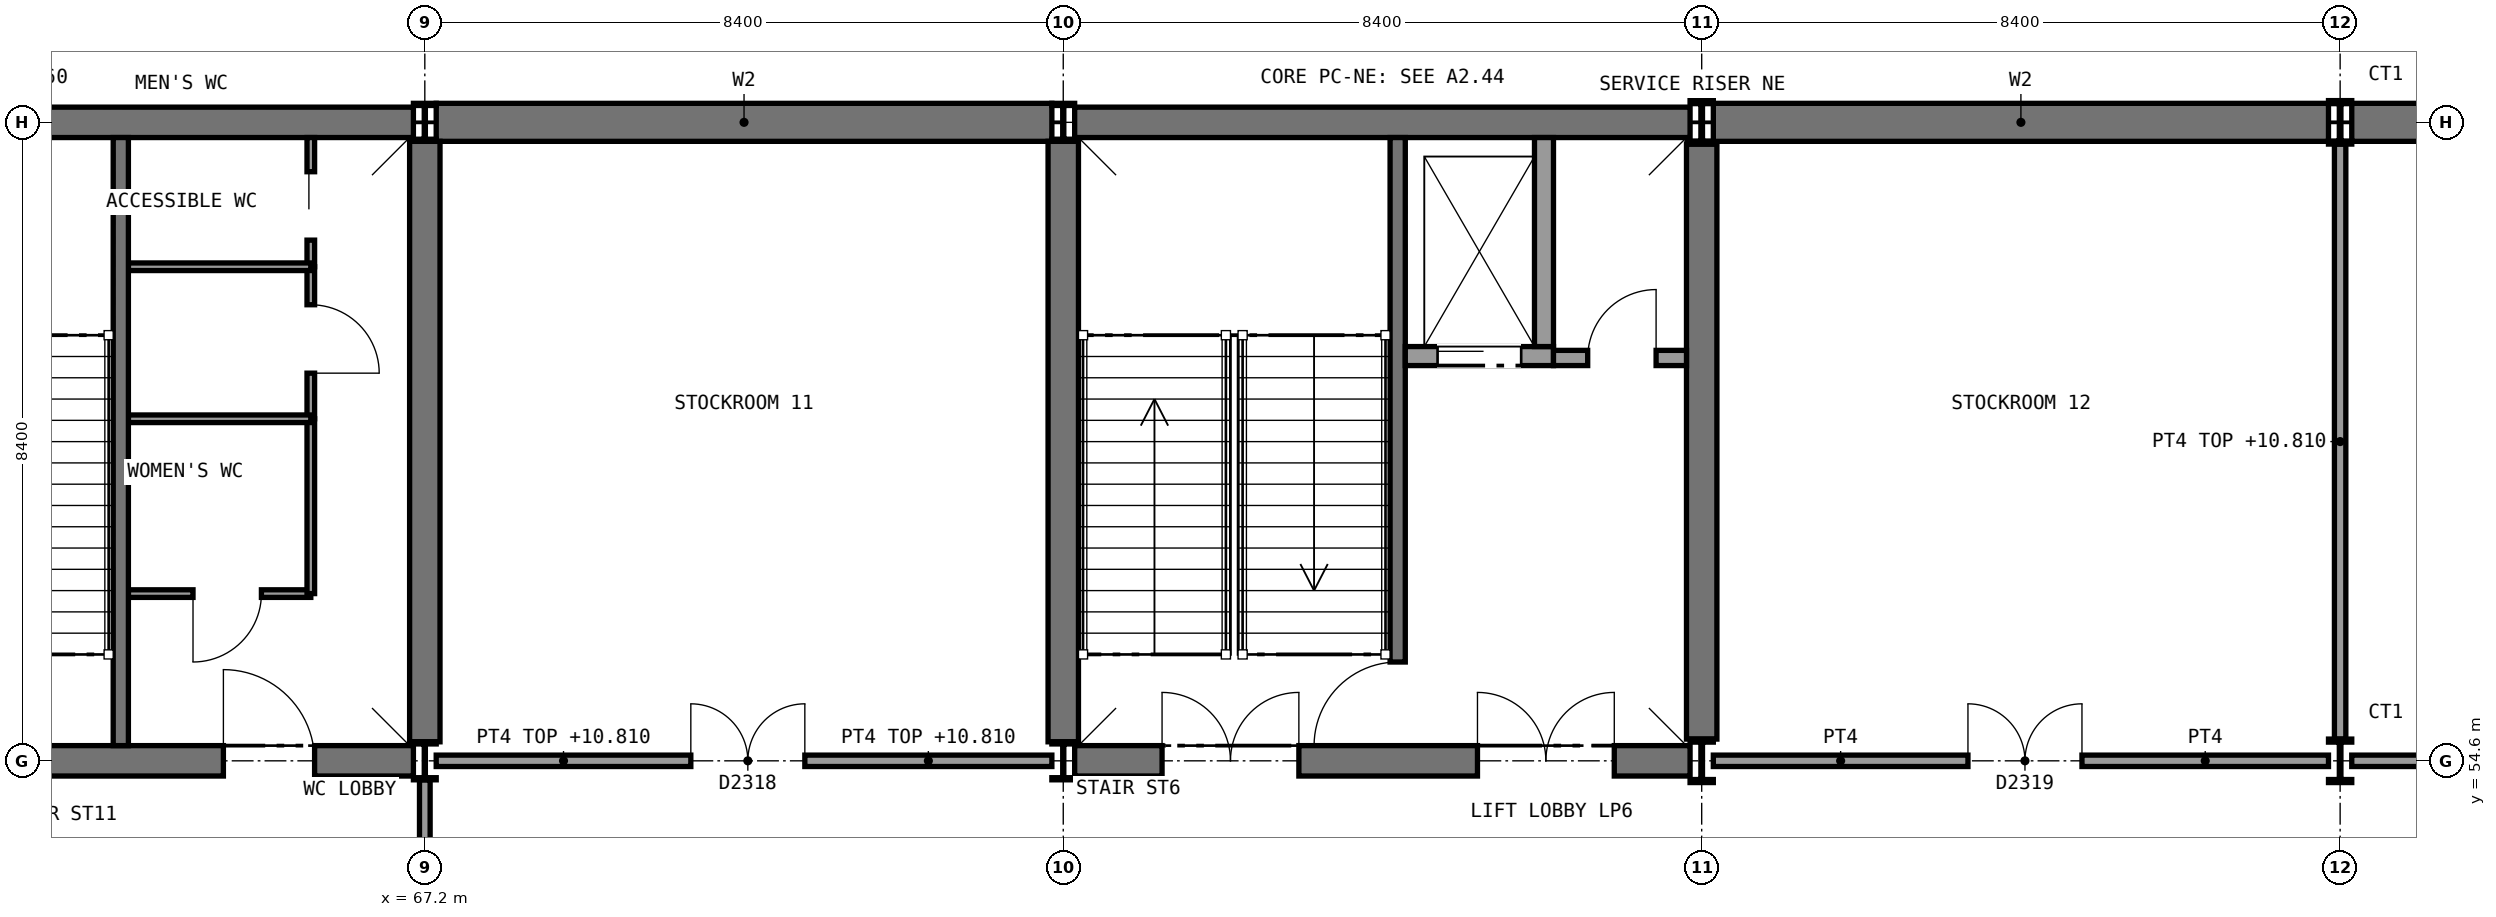
"""IFC4 building model, lengths in metres.
Left out: names, types, materials, properties, quantities, classifications, styles, units other than length and angle.
Written with IfcOpenShell. Run it as: python <this file> out.ifc"""

import sys

from ifc_helpers import new_model, si_unit, direction, frame, frame_2d, origin, origin_2d, place, context, subcontext, project, spatial, rectangle, i_section, extrude, element, fill, save


model = new_model("IFC4")
c1 = context("Model", 3, precision=1e-05, world=origin(), true_north=direction((0.0, 1.0)))
c2 = subcontext(c1, "Body", "Model", "MODEL_VIEW")
j1 = project(units=[si_unit("LENGTHUNIT", "METRE"), si_unit("PLANEANGLEUNIT", "RADIAN")], contexts=[c1])
p1 = place(None, origin())
s1 = spatial("IfcSite", under=j1, at=p1, CompositionType="ELEMENT")
p2 = place(p1, origin())
s2 = spatial("IfcBuilding", under=s1, at=p2, CompositionType="ELEMENT")
p3 = place(p2, frame((0.0, 0.0, 6.0)))
s3 = spatial("IfcBuildingStorey", under=s2, at=p3, CompositionType="ELEMENT", Elevation=6.0)
p4 = place(p3, frame((67.35, 63.0, 0.0), z_axis=(0.0, 0.0, 1.0), x_axis=(1.0, 0.0, 0.0)))
e1 = element("IfcWall", 1, at=p4, inside=s3, PredefinedType="SHEAR", context=c2, shape_type="SweptSolid", body=[
    extrude(rectangle(XDim=8.1, YDim=0.5, at=frame_2d((4.05, 0.0))), origin(), (0.0, 0.0, 1.0), 5.25),
])
p5 = place(p3, frame((84.153, 63.0, 0.0), z_axis=(0.0, 0.0, 1.0), x_axis=(1.0, 0.0, 0.0)))
e2 = element("IfcWall", 2, at=p5, inside=s3, PredefinedType="SHEAR", context=c2, shape_type="SweptSolid", body=[
    extrude(rectangle(XDim=8.094, YDim=0.5, at=frame_2d((4.047, 0.0))), origin(), (0.0, 0.0, 1.0), 5.25),
])
p6 = place(p3, frame((92.553, 63.0, 0.0), z_axis=(0.0, 0.0, 1.0), x_axis=(1.0, 0.0, 0.0)))
e3 = element("IfcWall", 3, at=p6, inside=s3, PredefinedType="SHEAR", context=c2, shape_type="SweptSolid", body=[
    extrude(rectangle(XDim=8.094, YDim=0.5, at=frame_2d((4.047, 0.0))), origin(), (0.0, 0.0, 1.0), 5.25),
])
p7 = place(p3, frame((75.75, 63.0, 0.0), z_axis=(0.0, 0.0, 1.0), x_axis=(1.0, 0.0, 0.0)))
e4 = element("IfcWall", 4, at=p7, inside=s3, PredefinedType="SHEAR", context=c2, shape_type="SweptSolid", body=[
    extrude(rectangle(XDim=8.097, YDim=0.4, at=frame_2d((4.048, 0.0))), origin(), (0.0, 0.0, 1.0), 5.25),
])
p8 = place(p3, frame((75.75, 54.6, 0.0), z_axis=(0.0, 0.0, 1.0), x_axis=(1.0, 0.0, 0.0)))
e5 = element("IfcWall", 5, at=p8, inside=s3, PredefinedType="SHEAR", context=c2, shape_type="SweptSolid", body=[
    extrude(rectangle(XDim=8.097, YDim=0.4, at=frame_2d((4.048, 0.0))), origin(), (0.0, 0.0, 1.0), 5.25),
])
p9 = place(p8, frame((1.15, 0.0, 0.0)))
e6 = element("IfcOpeningElement", 6, at=p9, cuts=e5, PredefinedType="OPENING", context=c2, shape_type="SweptSolid", body=[
    extrude(rectangle(XDim=1.8, YDim=2.1, at=frame_2d((0.9, 1.05))), frame((0.0, 0.21, 0.0), z_axis=(0.0, -1.0, 0.0), x_axis=(1.0, 0.0, 0.0)), (0.0, 0.0, 1.0), 0.42),
])
p10 = place(p8, frame((5.3, 0.0, 0.0)))
e7 = element("IfcOpeningElement", 7, at=p10, cuts=e5, PredefinedType="OPENING", context=c2, shape_type="SweptSolid", body=[
    extrude(rectangle(XDim=1.8, YDim=2.1, at=frame_2d((0.9, 1.05))), frame((0.0, 0.21, 0.0), z_axis=(0.0, -1.0, 0.0), x_axis=(1.0, 0.0, 0.0)), (0.0, 0.0, 1.0), 0.42),
])
p11 = place(p3, frame((75.6, 54.85, 0.0), z_axis=(0.0, 0.0, 1.0), x_axis=(0.0, 1.0, 0.0)))
e8 = element("IfcWall", 8, at=p11, inside=s3, PredefinedType="SHEAR", context=c2, shape_type="SweptSolid", body=[
    extrude(rectangle(XDim=7.9, YDim=0.4, at=frame_2d((3.95, 0.0))), origin(), (0.0, 0.0, 1.0), 5.25),
])
p12 = place(p3, frame((84.0, 54.886, 0.0), z_axis=(0.0, 0.0, 1.0), x_axis=(0.0, 1.0, 0.0)))
e9 = element("IfcWall", 9, at=p12, inside=s3, PredefinedType="SHEAR", context=c2, shape_type="SweptSolid", body=[
    extrude(rectangle(XDim=7.828, YDim=0.4, at=frame_2d((3.914, 0.0))), origin(), (0.0, 0.0, 1.0), 5.25),
])
p13 = place(p3, frame((58.95, 63.0, 0.0), z_axis=(0.0, 0.0, 1.0), x_axis=(1.0, 0.0, 0.0)))
e10 = element("IfcWall", 10, at=p13, inside=s3, PredefinedType="SHEAR", context=c2, shape_type="SweptSolid", body=[
    extrude(rectangle(XDim=8.1, YDim=0.4, at=frame_2d((4.05, 0.0))), origin(), (0.0, 0.0, 1.0), 5.25),
])
p14 = place(p3, frame((58.95, 54.6, 0.0), z_axis=(0.0, 0.0, 1.0), x_axis=(1.0, 0.0, 0.0)))
e11 = element("IfcWall", 11, at=p14, inside=s3, PredefinedType="SHEAR", context=c2, shape_type="SweptSolid", body=[
    extrude(rectangle(XDim=8.1, YDim=0.4, at=frame_2d((4.05, 0.0))), origin(), (0.0, 0.0, 1.0), 5.25),
])
p15 = place(p14, frame((1.15, 0.0, 0.0)))
e12 = element("IfcOpeningElement", 12, at=p15, cuts=e11, PredefinedType="OPENING", context=c2, shape_type="SweptSolid", body=[
    extrude(rectangle(XDim=1.8, YDim=2.1, at=frame_2d((0.9, 1.05))), frame((0.0, 0.21, 0.0), z_axis=(0.0, -1.0, 0.0), x_axis=(1.0, 0.0, 0.0)), (0.0, 0.0, 1.0), 0.42),
])
p16 = place(p14, frame((5.6, 0.0, 0.0)))
e13 = element("IfcOpeningElement", 13, at=p16, cuts=e11, PredefinedType="OPENING", context=c2, shape_type="SweptSolid", body=[
    extrude(rectangle(XDim=1.2, YDim=2.1, at=frame_2d((0.6, 1.05))), frame((0.0, 0.21, 0.0), z_axis=(0.0, -1.0, 0.0), x_axis=(1.0, 0.0, 0.0)), (0.0, 0.0, 1.0), 0.42),
])
p17 = place(p3, frame((67.2, 54.85, 0.0), z_axis=(0.0, 0.0, 1.0), x_axis=(0.0, 1.0, 0.0)))
e14 = element("IfcWall", 14, at=p17, inside=s3, PredefinedType="SHEAR", context=c2, shape_type="SweptSolid", body=[
    extrude(rectangle(XDim=7.9, YDim=0.4, at=frame_2d((3.95, 0.0))), origin(), (0.0, 0.0, 1.0), 5.25),
])
for number, where, z_axis, x_axis in (
    (15, (67.2, 54.6, 0.0), (0.0, 0.0, 1.0), (1.0, 0.0, 0.0)),
    (16, (67.2, 63.0, 0.0), (0.0, 0.0, 1.0), (1.0, 0.0, 0.0)),
    (17, (75.6, 54.6, 0.0), (0.0, 0.0, 1.0), (1.0, 0.0, 0.0)),
    (18, (75.6, 63.0, 0.0), (0.0, 0.0, 1.0), (1.0, 0.0, 0.0)),
):
    element("IfcColumn", number, at=place(p3, frame(where, z_axis=z_axis, x_axis=x_axis)), inside=s3, PredefinedType="COLUMN", context=c2, shape_type="SweptSolid", body=[
        extrude(i_section(OverallWidth=0.3, OverallDepth=0.5, WebThickness=0.014, FlangeThickness=0.028, FilletRadius=0.027, at=origin_2d()), origin(), (0.0, 0.0, 1.0), 5.4),
    ])
for number, where, z_axis, x_axis in (
    (19, (84.0, 54.6, 0.0), (0.0, 0.0, 1.0), (1.0, 0.0, 0.0)),
    (20, (84.0, 63.0, 0.0), (0.0, 0.0, 1.0), (1.0, 0.0, 0.0)),
    (21, (92.4, 54.6, 0.0), (0.0, 0.0, 1.0), (1.0, 0.0, 0.0)),
    (22, (92.4, 63.0, 0.0), (0.0, 0.0, 1.0), (1.0, 0.0, 0.0)),
):
    element("IfcColumn", number, at=place(p3, frame(where, z_axis=z_axis, x_axis=x_axis)), inside=s3, PredefinedType="COLUMN", context=c2, shape_type="SweptSolid", body=[
        extrude(i_section(OverallWidth=0.306, OverallDepth=0.572, WebThickness=0.021, FlangeThickness=0.04, FilletRadius=0.027, at=origin_2d()), origin(), (0.0, 0.0, 1.0), 5.4),
    ])
p18 = place(p3, frame((63.3, 56.8, 0.0), z_axis=(0.0, 0.0, 1.0), x_axis=(1.0, 0.0, 0.0)))
e23 = element("IfcWall", 23, at=p18, inside=s3, PredefinedType="PARTITIONING", context=c2, shape_type="SweptSolid", body=[
    extrude(rectangle(XDim=2.4, YDim=0.1, at=frame_2d((1.2, 0.0))), origin(), (0.0, 0.0, 1.0), 5.18),
])
p19 = place(p18, frame((0.85, 0.0, 0.0)))
e24 = element("IfcOpeningElement", 24, at=p19, cuts=e23, PredefinedType="OPENING", context=c2, shape_type="SweptSolid", body=[
    extrude(rectangle(XDim=0.9, YDim=2.1, at=frame_2d((0.45, 1.05))), frame((0.0, 0.06, 0.0), z_axis=(0.0, -1.0, 0.0), x_axis=(1.0, 0.0, 0.0)), (0.0, 0.0, 1.0), 0.12),
])
p20 = place(p3, frame((65.7, 56.8, 0.0), z_axis=(0.0, 0.0, 1.0), x_axis=(0.0, 1.0, 0.0)))
e25 = element("IfcWall", 25, at=p20, inside=s3, PredefinedType="PARTITIONING", context=c2, shape_type="SweptSolid", body=[
    extrude(rectangle(XDim=2.3, YDim=0.1, at=frame_2d((1.15, 0.0))), origin(), (0.0, 0.0, 1.0), 5.18),
])
p21 = place(p3, frame((65.7, 59.1, 0.0), z_axis=(0.0, 0.0, 1.0), x_axis=(0.0, 1.0, 0.0)))
e26 = element("IfcWall", 26, at=p21, inside=s3, PredefinedType="PARTITIONING", context=c2, shape_type="SweptSolid", body=[
    extrude(rectangle(XDim=2.0, YDim=0.1, at=frame_2d((1.0, 0.0))), origin(), (0.0, 0.0, 1.0), 5.18),
])
p22 = place(p21, frame((0.6, 0.0, 0.0)))
e27 = element("IfcOpeningElement", 27, at=p22, cuts=e26, PredefinedType="OPENING", context=c2, shape_type="SweptSolid", body=[
    extrude(rectangle(XDim=0.9, YDim=2.1, at=frame_2d((0.45, 1.05))), frame((0.0, 0.06, 0.0), z_axis=(0.0, -1.0, 0.0), x_axis=(1.0, 0.0, 0.0)), (0.0, 0.0, 1.0), 0.12),
])
p23 = place(p3, frame((65.7, 61.1, 0.0), z_axis=(0.0, 0.0, 1.0), x_axis=(0.0, 1.0, 0.0)))
e28 = element("IfcWall", 28, at=p23, inside=s3, PredefinedType="PARTITIONING", context=c2, shape_type="SweptSolid", body=[
    extrude(rectangle(XDim=1.7, YDim=0.1, at=frame_2d((0.85, 0.0))), origin(), (0.0, 0.0, 1.0), 5.18),
])
p24 = place(p23, frame((0.35, 0.0, 0.0)))
e29 = element("IfcOpeningElement", 29, at=p24, cuts=e28, PredefinedType="OPENING", context=c2, shape_type="SweptSolid", body=[
    extrude(rectangle(XDim=0.9, YDim=2.1, at=frame_2d((0.45, 1.05))), frame((0.0, 0.06, 0.0), z_axis=(0.0, -1.0, 0.0), x_axis=(1.0, 0.0, 0.0)), (0.0, 0.0, 1.0), 0.12),
])
for number, where, z_axis, x_axis in (
    (30, (63.3, 59.1, 0.0), (0.0, 0.0, 1.0), (1.0, 0.0, 0.0)),
    (31, (63.3, 61.1, 0.0), (0.0, 0.0, 1.0), (1.0, 0.0, 0.0)),
):
    element("IfcWall", number, at=place(p3, frame(where, z_axis=z_axis, x_axis=x_axis)), inside=s3, PredefinedType="PARTITIONING", context=c2, shape_type="SweptSolid", body=[
        extrude(rectangle(XDim=2.4, YDim=0.1, at=frame_2d((1.2, 0.0))), origin(), (0.0, 0.0, 1.0), 5.18),
    ])
p25 = place(p3, frame((67.35, 54.6, 0.0), z_axis=(0.0, 0.0, 1.0), x_axis=(1.0, 0.0, 0.0)))
e32 = element("IfcWall", 32, at=p25, inside=s3, PredefinedType="SOLIDWALL", context=c2, shape_type="SweptSolid", body=[
    extrude(rectangle(XDim=8.1, YDim=0.15, at=frame_2d((4.05, 0.0))), origin(), (0.0, 0.0, 1.0), 4.81),
])
p26 = place(p25, frame((3.35, 0.0, 0.0)))
e33 = element("IfcOpeningElement", 33, at=p26, cuts=e32, PredefinedType="OPENING", context=c2, shape_type="SweptSolid", body=[
    extrude(rectangle(XDim=1.5, YDim=2.1, at=frame_2d((0.75, 1.05))), frame((0.0, 0.085, 0.0), z_axis=(0.0, -1.0, 0.0), x_axis=(1.0, 0.0, 0.0)), (0.0, 0.0, 1.0), 0.17),
])
p27 = place(p3, frame((92.4, 54.886, 0.0), z_axis=(0.0, 0.0, 1.0), x_axis=(0.0, 1.0, 0.0)))
e34 = element("IfcWall", 34, at=p27, inside=s3, PredefinedType="SOLIDWALL", context=c2, shape_type="SweptSolid", body=[
    extrude(rectangle(XDim=7.828, YDim=0.15, at=frame_2d((3.914, 0.0))), origin(), (0.0, 0.0, 1.0), 4.81),
])
p28 = place(p3, frame((84.153, 54.6, 0.0), z_axis=(0.0, 0.0, 1.0), x_axis=(1.0, 0.0, 0.0)))
e35 = element("IfcWall", 35, at=p28, inside=s3, PredefinedType="SOLIDWALL", context=c2, shape_type="SweptSolid", body=[
    extrude(rectangle(XDim=8.094, YDim=0.15, at=frame_2d((4.047, 0.0))), origin(), (0.0, 0.0, 1.0), 4.92),
])
p29 = place(p28, frame((3.35, 0.0, 0.0)))
e36 = element("IfcOpeningElement", 36, at=p29, cuts=e35, PredefinedType="OPENING", context=c2, shape_type="SweptSolid", body=[
    extrude(rectangle(XDim=1.5, YDim=2.1, at=frame_2d((0.75, 1.05))), frame((0.0, 0.085, 0.0), z_axis=(0.0, -1.0, 0.0), x_axis=(1.0, 0.0, 0.0)), (0.0, 0.0, 1.0), 0.17),
])
p30 = place(p3, frame((92.553, 54.6, 0.0), z_axis=(0.0, 0.0, 1.0), x_axis=(1.0, 0.0, 0.0)))
e37 = element("IfcWall", 37, at=p30, inside=s3, PredefinedType="SOLIDWALL", context=c2, shape_type="SweptSolid", body=[
    extrude(rectangle(XDim=8.094, YDim=0.15, at=frame_2d((4.047, 0.0))), origin(), (0.0, 0.0, 1.0), 4.92),
])
p31 = place(p30, frame((3.35, 0.0, 0.0)))
e38 = element("IfcOpeningElement", 38, at=p31, cuts=e37, PredefinedType="OPENING", context=c2, shape_type="SweptSolid", body=[
    extrude(rectangle(XDim=1.5, YDim=2.1, at=frame_2d((0.75, 1.05))), frame((0.0, 0.085, 0.0), z_axis=(0.0, -1.0, 0.0), x_axis=(1.0, 0.0, 0.0)), (0.0, 0.0, 1.0), 0.17),
])
p32 = place(p3, frame((67.2, 51.35, 0.0), z_axis=(0.0, 0.0, 1.0), x_axis=(0.0, 1.0, 0.0)))
e39 = element("IfcWall", 39, at=p32, inside=s3, PredefinedType="PARTITIONING", context=c2, shape_type="SweptSolid", body=[
    extrude(rectangle(XDim=3.0, YDim=0.14, at=frame_2d((1.5, 0.0))), origin(), (0.0, 0.0, 1.0), 4.81),
])
p33 = place(p3, frame((80.0, 62.8, 0.0), z_axis=(0.0, 0.0, 1.0), x_axis=(0.0, -1.0, 0.0)))
e40 = element("IfcWall", 40, at=p33, inside=s3, PredefinedType="SHEAR", context=c2, shape_type="SweptSolid", body=[
    extrude(rectangle(XDim=8.0, YDim=0.2, at=frame_2d((4.0, 0.0))), origin(), (0.0, 0.0, 1.0), 5.25),
])
p34 = place(p33, frame((6.9, 0.0, 0.0)))
e41 = element("IfcOpeningElement", 41, at=p34, cuts=e40, PredefinedType="OPENING", context=c2, shape_type="SweptSolid", body=[
    extrude(rectangle(XDim=1.11, YDim=2.1, at=frame_2d((0.555, 1.05))), frame((0.0, 0.11, 0.0), z_axis=(0.0, -1.0, 0.0), x_axis=(1.0, 0.0, 0.0)), (0.0, 0.0, 1.0), 0.22),
])
p35 = place(p3, frame((80.1, 59.925, 0.0), z_axis=(0.0, 0.0, 1.0), x_axis=(1.0, 0.0, 0.0)))
e42 = element("IfcWall", 42, at=p35, inside=s3, PredefinedType="SOLIDWALL", context=c2, shape_type="SweptSolid", body=[
    extrude(rectangle(XDim=1.95, YDim=0.25, at=frame_2d((0.975, 0.0))), origin(), (0.0, 0.0, 1.0), 5.4),
])
p36 = place(p35, frame((0.425, 0.0, 0.0)))
e43 = element("IfcOpeningElement", 43, at=p36, cuts=e42, PredefinedType="OPENING", context=c2, shape_type="SweptSolid", body=[
    extrude(rectangle(XDim=1.1, YDim=2.1, at=frame_2d((0.55, 1.05))), frame((0.0, 0.135, 0.0), z_axis=(0.0, -1.0, 0.0), x_axis=(1.0, 0.0, 0.0)), (0.0, 0.0, 1.0), 0.27),
])
p37 = place(p3, frame((81.925, 62.8, 0.0), z_axis=(0.0, 0.0, 1.0), x_axis=(0.0, -1.0, 0.0)))
e44 = element("IfcWall", 44, at=p37, inside=s3, PredefinedType="SOLIDWALL", context=c2, shape_type="SweptSolid", body=[
    extrude(rectangle(XDim=2.75, YDim=0.25, at=frame_2d((1.375, 0.0))), origin(), (0.0, 0.0, 1.0), 5.4),
])
p38 = place(p3, frame((82.05, 59.9, 0.0), z_axis=(0.0, 0.0, 1.0), x_axis=(1.0, 0.0, 0.0)))
e45 = element("IfcWall", 45, at=p38, inside=s3, PredefinedType="PARTITIONING", context=c2, shape_type="SweptSolid", body=[
    extrude(rectangle(XDim=1.75, YDim=0.2, at=frame_2d((0.875, 0.0))), origin(), (0.0, 0.0, 1.0), 5.25),
])
p39 = place(p38, frame((0.45, 0.0, 0.0)))
e46 = element("IfcOpeningElement", 46, at=p39, cuts=e45, PredefinedType="OPENING", context=c2, shape_type="SweptSolid", body=[
    extrude(rectangle(XDim=0.9, YDim=2.1, at=frame_2d((0.45, 1.05))), frame((0.0, 0.11, 0.0), z_axis=(0.0, -1.0, 0.0), x_axis=(1.0, 0.0, 0.0)), (0.0, 0.0, 1.0), 0.22),
])
p40 = place(p3, frame((63.2, 62.8, 0.0), z_axis=(0.0, 0.0, 1.0), x_axis=(0.0, -1.0, 0.0)))
e47 = element("IfcWall", 47, at=p40, inside=s3, PredefinedType="SHEAR", context=c2, shape_type="SweptSolid", body=[
    extrude(rectangle(XDim=8.0, YDim=0.2, at=frame_2d((4.0, 0.0))), origin(), (0.0, 0.0, 1.0), 5.25),
])
p41 = place(p19, frame((0.9, 0.0, 0.0), z_axis=(0.0, 0.0, 1.0), x_axis=(-1.0, 0.0, 0.0)))
e48 = element("IfcDoor", 48, at=p41, inside=s3, OperationType="SINGLE_SWING_RIGHT", PredefinedType="DOOR", context=c2, shape_type="SweptSolid", body=[
    extrude(rectangle(XDim=0.9, YDim=2.1, at=frame_2d((0.45, 1.05))), frame((0.0, 0.025, 0.0), z_axis=(0.0, -1.0, 0.0), x_axis=(1.0, 0.0, 0.0)), (0.0, 0.0, 1.0), 0.05),
])
fill(e24, e48)
p42 = place(p22, frame((0.9, 0.0, 0.0), z_axis=(0.0, 0.0, 1.0), x_axis=(-1.0, 0.0, 0.0)))
e49 = element("IfcDoor", 49, at=p42, inside=s3, OperationType="SINGLE_SWING_RIGHT", PredefinedType="DOOR", context=c2, shape_type="SweptSolid", body=[
    extrude(rectangle(XDim=0.9, YDim=2.1, at=frame_2d((0.45, 1.05))), frame((0.0, 0.025, 0.0), z_axis=(0.0, -1.0, 0.0), x_axis=(1.0, 0.0, 0.0)), (0.0, 0.0, 1.0), 0.05),
])
fill(e27, e49)
p43 = place(p24, origin())
e50 = element("IfcDoor", 50, at=p43, inside=s3, OperationType="SLIDING_TO_RIGHT", PredefinedType="DOOR", context=c2, shape_type="SweptSolid", body=[
    extrude(rectangle(XDim=0.9, YDim=2.1, at=frame_2d((0.45, 1.05))), frame((0.0, 0.025, 0.0), z_axis=(0.0, -1.0, 0.0), x_axis=(1.0, 0.0, 0.0)), (0.0, 0.0, 1.0), 0.05),
])
fill(e29, e50)
p44 = place(p26, origin())
e51 = element("IfcDoor", 51, at=p44, inside=s3, OperationType="DOUBLE_DOOR_SINGLE_SWING", PredefinedType="DOOR", context=c2, shape_type="SweptSolid", body=[
    extrude(rectangle(XDim=1.5, YDim=2.1, at=frame_2d((0.75, 1.05))), frame((0.0, 0.025, 0.0), z_axis=(0.0, -1.0, 0.0), x_axis=(1.0, 0.0, 0.0)), (0.0, 0.0, 1.0), 0.05),
])
fill(e33, e51)
p45 = place(p29, origin())
e52 = element("IfcDoor", 52, at=p45, inside=s3, OperationType="DOUBLE_DOOR_SINGLE_SWING", PredefinedType="DOOR", context=c2, shape_type="SweptSolid", body=[
    extrude(rectangle(XDim=1.5, YDim=2.1, at=frame_2d((0.75, 1.05))), frame((0.0, 0.025, 0.0), z_axis=(0.0, -1.0, 0.0), x_axis=(1.0, 0.0, 0.0)), (0.0, 0.0, 1.0), 0.05),
])
fill(e36, e52)
p46 = place(p34, frame((1.1, 0.0, 0.0), z_axis=(0.0, 0.0, 1.0), x_axis=(-1.0, 0.0, 0.0)))
e53 = element("IfcDoor", 53, at=p46, inside=s3, OperationType="SINGLE_SWING_LEFT", PredefinedType="DOOR", context=c2, shape_type="SweptSolid", body=[
    extrude(rectangle(XDim=1.1, YDim=2.1, at=frame_2d((0.55, 1.05))), frame((0.0, 0.025, 0.0), z_axis=(0.0, -1.0, 0.0), x_axis=(1.0, 0.0, 0.0)), (0.0, 0.0, 1.0), 0.05),
])
fill(e41, e53)
p47 = place(p36, frame((1.1, 0.0, 0.0), z_axis=(0.0, 0.0, 1.0), x_axis=(-1.0, 0.0, 0.0)))
e54 = element("IfcDoor", 54, at=p47, inside=s3, OperationType="SLIDING_TO_RIGHT", PredefinedType="DOOR", context=c2, shape_type="SweptSolid", body=[
    extrude(rectangle(XDim=1.1, YDim=2.1, at=frame_2d((0.55, 1.05))), frame((0.0, 0.025, 0.0), z_axis=(0.0, -1.0, 0.0), x_axis=(1.0, 0.0, 0.0)), (0.0, 0.0, 1.0), 0.05),
])
fill(e43, e54)
p48 = place(p39, origin())
e55 = element("IfcDoor", 55, at=p48, inside=s3, OperationType="SINGLE_SWING_RIGHT", PredefinedType="DOOR", context=c2, shape_type="SweptSolid", body=[
    extrude(rectangle(XDim=0.9, YDim=2.1, at=frame_2d((0.45, 1.05))), frame((0.0, 0.025, 0.0), z_axis=(0.0, -1.0, 0.0), x_axis=(1.0, 0.0, 0.0)), (0.0, 0.0, 1.0), 0.05),
])
fill(e46, e55)
p49 = place(p9, origin())
e56 = element("IfcDoor", 56, at=p49, inside=s3, OperationType="DOUBLE_DOOR_SINGLE_SWING", PredefinedType="DOOR", context=c2, shape_type="SweptSolid", body=[
    extrude(rectangle(XDim=1.8, YDim=2.1, at=frame_2d((0.9, 1.05))), frame((0.0, 0.025, 0.0), z_axis=(0.0, -1.0, 0.0), x_axis=(1.0, 0.0, 0.0)), (0.0, 0.0, 1.0), 0.05),
])
fill(e6, e56)
p50 = place(p10, origin())
e57 = element("IfcDoor", 57, at=p50, inside=s3, OperationType="DOUBLE_DOOR_SINGLE_SWING", PredefinedType="DOOR", context=c2, shape_type="SweptSolid", body=[
    extrude(rectangle(XDim=1.8, YDim=2.1, at=frame_2d((0.9, 1.05))), frame((0.0, 0.025, 0.0), z_axis=(0.0, -1.0, 0.0), x_axis=(1.0, 0.0, 0.0)), (0.0, 0.0, 1.0), 0.05),
])
fill(e7, e57)
p51 = place(p16, origin())
e58 = element("IfcDoor", 58, at=p51, inside=s3, OperationType="SINGLE_SWING_LEFT", PredefinedType="DOOR", context=c2, shape_type="SweptSolid", body=[
    extrude(rectangle(XDim=1.2, YDim=2.1, at=frame_2d((0.6, 1.05))), frame((0.0, 0.025, 0.0), z_axis=(0.0, -1.0, 0.0), x_axis=(1.0, 0.0, 0.0)), (0.0, 0.0, 1.0), 0.05),
])
fill(e13, e58)
save(model, sys.argv[1])
